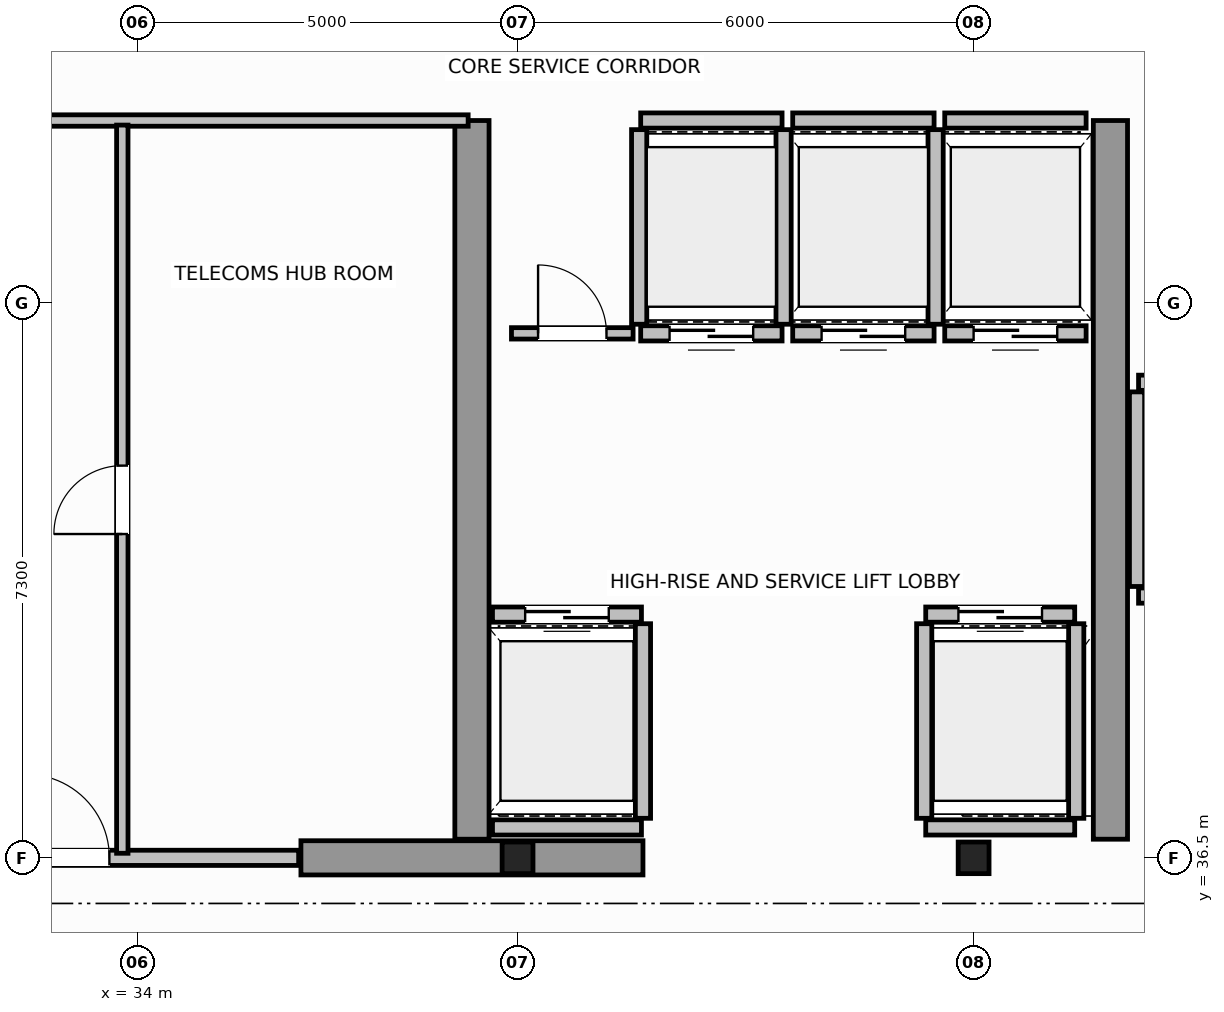
"""IFC4 building model, lengths in metres.
Left out: names, types, materials, properties, quantities, classifications, styles, units other than length and angle.
Written with IfcOpenShell. Run it as: python <this file> out.ifc"""

import sys

from ifc_helpers import new_model, si_unit, direction, frame, frame_2d, origin, origin_2d, place, context, subcontext, project, spatial, rectangle, i_section, extrude, source, transform, mapped, element, fill, save


model = new_model("IFC4")
c1 = context("Model", 3, precision=1e-05, world=origin(), true_north=direction((0.0, 1.0)))
c2 = subcontext(c1, "Body", "Model", "MODEL_VIEW")
j1 = project(units=[si_unit("LENGTHUNIT", "METRE"), si_unit("PLANEANGLEUNIT", "RADIAN")], contexts=[c1])
p1 = place(None, origin())
s1 = spatial("IfcSite", under=j1, at=p1, CompositionType="ELEMENT")
p2 = place(p1, origin())
s2 = spatial("IfcBuilding", under=s1, at=p2, CompositionType="ELEMENT")
p3 = place(p2, frame((0.0, 0.0, 299.2)))
s3 = spatial("IfcBuildingStorey", under=s2, at=p3, CompositionType="ELEMENT", Elevation=299.2)
m1 = source(origin(), c2, "Body", "SweptSolid", [
    extrude(i_section(OverallWidth=0.406, OverallDepth=0.416, WebThickness=0.03, FlangeThickness=0.042, FilletRadius=0.015, at=origin_2d()), origin(), (0.0, 0.0, 1.0), 4.6),
])
for number, where, z_axis, x_axis in (
    (1, (39.0, 36.5, 0.0), (0.0, 0.0, 1.0), (1.0, 0.0, 0.0)),
    (2, (45.0, 36.5, 0.0), (0.0, 0.0, 1.0), (1.0, 0.0, 0.0)),
):
    element("IfcColumn", number, at=place(p3, frame(where, z_axis=z_axis, x_axis=x_axis)), inside=s3, PredefinedType="COLUMN", context=c2, shape_type="MappedRepresentation", body=[
        mapped(m1, transform((0.0, 0.0, 0.0), scale=1.0)),
    ])
p4 = place(p3, frame((36.15, 36.5, 0.0), z_axis=(0.0, 0.0, 1.0), x_axis=(1.0, 0.0, 0.0)))
e3 = element("IfcWall", 3, at=p4, inside=s3, PredefinedType="SHEAR", context=c2, shape_type="SweptSolid", body=[
    extrude(rectangle(XDim=4.5, YDim=0.45, at=frame_2d((2.25, 0.0))), origin(), (0.0, 0.0, 1.0), 4.6),
])
for number, where, z_axis, x_axis in (
    (4, (38.4, 36.745, 0.0), (0.0, 0.0, 1.0), (0.0, 1.0, 0.0)),
    (5, (46.8, 36.745, 0.0), (0.0, 0.0, 1.0), (0.0, 1.0, 0.0)),
):
    element("IfcWall", number, at=place(p3, frame(where, z_axis=z_axis, x_axis=x_axis)), inside=s3, PredefinedType="SHEAR", context=c2, shape_type="SweptSolid", body=[
        extrude(rectangle(XDim=9.455, YDim=0.45, at=frame_2d((4.728, 0.0))), origin(), (0.0, 0.0, 1.0), 4.6),
    ])
p5 = place(p3, frame((38.67, 39.7, 0.0), z_axis=(0.0, 0.0, 1.0), x_axis=(1.0, 0.0, 0.0)))
e6 = element("IfcWall", 6, at=p5, inside=s3, PredefinedType="SOLIDWALL", context=c2, shape_type="SweptSolid", body=[
    extrude(rectangle(XDim=1.96, YDim=0.2, at=frame_2d((0.98, 0.0))), origin(), (0.0, 0.0, 1.0), 4.3),
])
p6 = place(p5, frame((0.43, 0.0, 0.0)))
e7 = element("IfcOpeningElement", 7, at=p6, cuts=e6, PredefinedType="OPENING", context=c2, shape_type="SweptSolid", body=[
    extrude(rectangle(XDim=1.1, YDim=2.15, at=frame_2d((0.55, 1.075))), frame((0.0, 0.11, 0.0), z_axis=(0.0, -1.0, 0.0), x_axis=(1.0, 0.0, 0.0)), (0.0, 0.0, 1.0), 0.22),
])
p7 = place(p3, frame((38.67, 36.9, 0.0), z_axis=(0.0, 0.0, 1.0), x_axis=(1.0, 0.0, 0.0)))
e8 = element("IfcWall", 8, at=p7, inside=s3, PredefinedType="SOLIDWALL", context=c2, shape_type="SweptSolid", body=[
    extrude(rectangle(XDim=1.96, YDim=0.2, at=frame_2d((0.98, 0.0))), origin(), (0.0, 0.0, 1.0), 3.09),
])
p8 = place(p3, frame((40.65, 37.02, 0.0), z_axis=(0.0, 0.0, 1.0), x_axis=(0.0, 1.0, 0.0)))
e9 = element("IfcWall", 9, at=p8, inside=s3, PredefinedType="SOLIDWALL", context=c2, shape_type="SweptSolid", body=[
    extrude(rectangle(XDim=2.56, YDim=0.2, at=frame_2d((1.28, 0.0))), origin(), (0.0, 0.0, 1.0), 4.3),
])
p9 = place(p3, frame((44.37, 39.7, 0.0), z_axis=(0.0, 0.0, 1.0), x_axis=(1.0, 0.0, 0.0)))
e10 = element("IfcWall", 10, at=p9, inside=s3, PredefinedType="SOLIDWALL", context=c2, shape_type="SweptSolid", body=[
    extrude(rectangle(XDim=1.96, YDim=0.2, at=frame_2d((0.98, 0.0))), origin(), (0.0, 0.0, 1.0), 4.3),
])
p10 = place(p9, frame((0.43, 0.0, 0.0)))
e11 = element("IfcOpeningElement", 11, at=p10, cuts=e10, PredefinedType="OPENING", context=c2, shape_type="SweptSolid", body=[
    extrude(rectangle(XDim=1.1, YDim=2.15, at=frame_2d((0.55, 1.075))), frame((0.0, 0.11, 0.0), z_axis=(0.0, -1.0, 0.0), x_axis=(1.0, 0.0, 0.0)), (0.0, 0.0, 1.0), 0.22),
])
p11 = place(p3, frame((44.37, 36.9, 0.0), z_axis=(0.0, 0.0, 1.0), x_axis=(1.0, 0.0, 0.0)))
e12 = element("IfcWall", 12, at=p11, inside=s3, PredefinedType="SOLIDWALL", context=c2, shape_type="SweptSolid", body=[
    extrude(rectangle(XDim=1.96, YDim=0.2, at=frame_2d((0.98, 0.0))), origin(), (0.0, 0.0, 1.0), 3.09),
])
for number, where, z_axis, x_axis in (
    (13, (44.35, 37.02, 0.0), (0.0, 0.0, 1.0), (0.0, 1.0, 0.0)),
    (14, (46.35, 37.02, 0.0), (0.0, 0.0, 1.0), (0.0, 1.0, 0.0)),
):
    element("IfcWall", number, at=place(p3, frame(where, z_axis=z_axis, x_axis=x_axis)), inside=s3, PredefinedType="SOLIDWALL", context=c2, shape_type="SweptSolid", body=[
        extrude(rectangle(XDim=2.56, YDim=0.2, at=frame_2d((1.28, 0.0))), origin(), (0.0, 0.0, 1.0), 4.3),
    ])
p12 = place(p3, frame((40.62, 43.4, 0.0), z_axis=(0.0, 0.0, 1.0), x_axis=(1.0, 0.0, 0.0)))
e15 = element("IfcWall", 15, at=p12, inside=s3, PredefinedType="SOLIDWALL", context=c2, shape_type="SweptSolid", body=[
    extrude(rectangle(XDim=1.86, YDim=0.2, at=frame_2d((0.93, 0.0))), origin(), (0.0, 0.0, 1.0), 4.3),
])
p13 = place(p12, frame((0.38, 0.0, 0.0)))
e16 = element("IfcOpeningElement", 16, at=p13, cuts=e15, PredefinedType="OPENING", context=c2, shape_type="SweptSolid", body=[
    extrude(rectangle(XDim=1.1, YDim=2.15, at=frame_2d((0.55, 1.075))), frame((0.0, 0.11, 0.0), z_axis=(0.0, -1.0, 0.0), x_axis=(1.0, 0.0, 0.0)), (0.0, 0.0, 1.0), 0.22),
])
p14 = place(p3, frame((40.62, 46.2, 0.0), z_axis=(0.0, 0.0, 1.0), x_axis=(1.0, 0.0, 0.0)))
e17 = element("IfcWall", 17, at=p14, inside=s3, PredefinedType="SOLIDWALL", context=c2, shape_type="SweptSolid", body=[
    extrude(rectangle(XDim=1.86, YDim=0.2, at=frame_2d((0.93, 0.0))), origin(), (0.0, 0.0, 1.0), 4.3),
])
for number, where, z_axis, x_axis in (
    (18, (40.6, 43.52, 0.0), (0.0, 0.0, 1.0), (0.0, 1.0, 0.0)),
    (19, (42.5, 43.52, 0.0), (0.0, 0.0, 1.0), (0.0, 1.0, 0.0)),
):
    element("IfcWall", number, at=place(p3, frame(where, z_axis=z_axis, x_axis=x_axis)), inside=s3, PredefinedType="SOLIDWALL", context=c2, shape_type="SweptSolid", body=[
        extrude(rectangle(XDim=2.56, YDim=0.2, at=frame_2d((1.28, 0.0))), origin(), (0.0, 0.0, 1.0), 4.3),
    ])
p15 = place(p3, frame((42.62, 43.4, 0.0), z_axis=(0.0, 0.0, 1.0), x_axis=(1.0, 0.0, 0.0)))
e20 = element("IfcWall", 20, at=p15, inside=s3, PredefinedType="SOLIDWALL", context=c2, shape_type="SweptSolid", body=[
    extrude(rectangle(XDim=1.86, YDim=0.2, at=frame_2d((0.93, 0.0))), origin(), (0.0, 0.0, 1.0), 4.3),
])
p16 = place(p15, frame((0.38, 0.0, 0.0)))
e21 = element("IfcOpeningElement", 21, at=p16, cuts=e20, PredefinedType="OPENING", context=c2, shape_type="SweptSolid", body=[
    extrude(rectangle(XDim=1.1, YDim=2.15, at=frame_2d((0.55, 1.075))), frame((0.0, 0.11, 0.0), z_axis=(0.0, -1.0, 0.0), x_axis=(1.0, 0.0, 0.0)), (0.0, 0.0, 1.0), 0.22),
])
p17 = place(p3, frame((42.62, 46.2, 0.0), z_axis=(0.0, 0.0, 1.0), x_axis=(1.0, 0.0, 0.0)))
e22 = element("IfcWall", 22, at=p17, inside=s3, PredefinedType="SOLIDWALL", context=c2, shape_type="SweptSolid", body=[
    extrude(rectangle(XDim=1.86, YDim=0.2, at=frame_2d((0.93, 0.0))), origin(), (0.0, 0.0, 1.0), 4.3),
])
p18 = place(p3, frame((44.5, 43.52, 0.0), z_axis=(0.0, 0.0, 1.0), x_axis=(0.0, 1.0, 0.0)))
e23 = element("IfcWall", 23, at=p18, inside=s3, PredefinedType="SOLIDWALL", context=c2, shape_type="SweptSolid", body=[
    extrude(rectangle(XDim=2.56, YDim=0.2, at=frame_2d((1.28, 0.0))), origin(), (0.0, 0.0, 1.0), 3.09),
])
p19 = place(p3, frame((44.62, 43.4, 0.0), z_axis=(0.0, 0.0, 1.0), x_axis=(1.0, 0.0, 0.0)))
e24 = element("IfcWall", 24, at=p19, inside=s3, PredefinedType="SOLIDWALL", context=c2, shape_type="SweptSolid", body=[
    extrude(rectangle(XDim=1.86, YDim=0.2, at=frame_2d((0.93, 0.0))), origin(), (0.0, 0.0, 1.0), 4.3),
])
p20 = place(p19, frame((0.38, 0.0, 0.0)))
e25 = element("IfcOpeningElement", 25, at=p20, cuts=e24, PredefinedType="OPENING", context=c2, shape_type="SweptSolid", body=[
    extrude(rectangle(XDim=1.1, YDim=2.15, at=frame_2d((0.55, 1.075))), frame((0.0, 0.11, 0.0), z_axis=(0.0, -1.0, 0.0), x_axis=(1.0, 0.0, 0.0)), (0.0, 0.0, 1.0), 0.22),
])
p21 = place(p3, frame((44.62, 46.2, 0.0), z_axis=(0.0, 0.0, 1.0), x_axis=(1.0, 0.0, 0.0)))
e26 = element("IfcWall", 26, at=p21, inside=s3, PredefinedType="SOLIDWALL", context=c2, shape_type="SweptSolid", body=[
    extrude(rectangle(XDim=1.86, YDim=0.2, at=frame_2d((0.93, 0.0))), origin(), (0.0, 0.0, 1.0), 4.3),
])
p22 = place(p3, frame((47.17, 39.95, 0.0), z_axis=(0.0, 0.0, 1.0), x_axis=(1.0, 0.0, 0.0)))
e27 = element("IfcWall", 27, at=p22, inside=s3, PredefinedType="SOLIDWALL", context=c2, shape_type="SweptSolid", body=[
    extrude(rectangle(XDim=2.16, YDim=0.2, at=frame_2d((1.08, 0.0))), origin(), (0.0, 0.0, 1.0), 4.3),
])
p23 = place(p22, frame((0.53, 0.0, 0.0)))
e28 = element("IfcOpeningElement", 28, at=p23, cuts=e27, PredefinedType="OPENING", context=c2, shape_type="SweptSolid", body=[
    extrude(rectangle(XDim=1.1, YDim=2.15, at=frame_2d((0.55, 1.075))), frame((0.0, 0.11, 0.0), z_axis=(0.0, -1.0, 0.0), x_axis=(1.0, 0.0, 0.0)), (0.0, 0.0, 1.0), 0.22),
])
p24 = place(p3, frame((47.17, 42.75, 0.0), z_axis=(0.0, 0.0, 1.0), x_axis=(1.0, 0.0, 0.0)))
e29 = element("IfcWall", 29, at=p24, inside=s3, PredefinedType="SOLIDWALL", context=c2, shape_type="SweptSolid", body=[
    extrude(rectangle(XDim=2.16, YDim=0.2, at=frame_2d((1.08, 0.0))), origin(), (0.0, 0.0, 1.0), 4.3),
])
p25 = place(p3, frame((47.15, 40.07, 0.0), z_axis=(0.0, 0.0, 1.0), x_axis=(0.0, 1.0, 0.0)))
e30 = element("IfcWall", 30, at=p25, inside=s3, PredefinedType="SOLIDWALL", context=c2, shape_type="SweptSolid", body=[
    extrude(rectangle(XDim=2.56, YDim=0.2, at=frame_2d((1.28, 0.0))), origin(), (0.0, 0.0, 1.0), 4.3),
])
p26 = place(p3, frame((32.08, 36.5, 0.0), z_axis=(0.0, 0.0, 1.0), x_axis=(1.0, 0.0, 0.0)))
e31 = element("IfcWall", 31, at=p26, inside=s3, PredefinedType="SOLIDWALL", context=c2, shape_type="SweptSolid", body=[
    extrude(rectangle(XDim=4.04, YDim=0.2, at=frame_2d((2.02, 0.0))), origin(), (0.0, 0.0, 1.0), 3.09),
])
p27 = place(p26, frame((0.45, 0.0, 0.0)))
e32 = element("IfcOpeningElement", 32, at=p27, cuts=e31, PredefinedType="OPENING", context=c2, shape_type="SweptSolid", body=[
    extrude(rectangle(XDim=1.1, YDim=2.15, at=frame_2d((0.55, 1.075))), frame((0.0, 0.11, 0.0), z_axis=(0.0, -1.0, 0.0), x_axis=(1.0, 0.0, 0.0)), (0.0, 0.0, 1.0), 0.22),
])
p28 = place(p3, frame((29.85, 46.2, 0.0), z_axis=(0.0, 0.0, 1.0), x_axis=(1.0, 0.0, 0.0)))
e33 = element("IfcWall", 33, at=p28, inside=s3, PredefinedType="PARTITIONING", context=c2, shape_type="SweptSolid", body=[
    extrude(rectangle(XDim=8.5, YDim=0.15, at=frame_2d((4.25, 0.0))), origin(), (0.0, 0.0, 1.0), 4.3),
])
p29 = place(p3, frame((33.8, 36.56, 0.0), z_axis=(0.0, 0.0, 1.0), x_axis=(0.0, 1.0, 0.0)))
e34 = element("IfcWall", 34, at=p29, inside=s3, PredefinedType="PARTITIONING", context=c2, shape_type="SweptSolid", body=[
    extrude(rectangle(XDim=9.58, YDim=0.15, at=frame_2d((4.79, 0.0))), origin(), (0.0, 0.0, 1.0), 4.3),
])
p30 = place(p29, frame((4.2, 0.0, 0.0)))
e35 = element("IfcOpeningElement", 35, at=p30, cuts=e34, PredefinedType="OPENING", context=c2, shape_type="SweptSolid", body=[
    extrude(rectangle(XDim=0.9, YDim=2.1, at=frame_2d((0.45, 1.05))), frame((0.0, 0.085, 0.0), z_axis=(0.0, -1.0, 0.0), x_axis=(1.0, 0.0, 0.0)), (0.0, 0.0, 1.0), 0.17),
])
p31 = place(p3, frame((38.92, 43.4, 0.0), z_axis=(0.0, 0.0, 1.0), x_axis=(1.0, 0.0, 0.0)))
e36 = element("IfcWall", 36, at=p31, inside=s3, PredefinedType="PARTITIONING", context=c2, shape_type="SweptSolid", body=[
    extrude(rectangle(XDim=1.6, YDim=0.15, at=frame_2d((0.8, 0.0))), origin(), (0.0, 0.0, 1.0), 4.3),
])
p32 = place(p31, frame((0.35, 0.0, 0.0)))
e37 = element("IfcOpeningElement", 37, at=p32, cuts=e36, PredefinedType="OPENING", context=c2, shape_type="SweptSolid", body=[
    extrude(rectangle(XDim=0.9, YDim=2.1, at=frame_2d((0.45, 1.05))), frame((0.0, 0.085, 0.0), z_axis=(0.0, -1.0, 0.0), x_axis=(1.0, 0.0, 0.0)), (0.0, 0.0, 1.0), 0.17),
])
m2 = source(origin(), c2, "Body", "SweptSolid", [
    extrude(rectangle(XDim=1.1, YDim=2.15, at=frame_2d((0.55, 1.075))), frame((0.0, 0.025, 0.0), z_axis=(0.0, -1.0, 0.0), x_axis=(1.0, 0.0, 0.0)), (0.0, 0.0, 1.0), 0.05),
])
p33 = place(p6, origin())
e38 = element("IfcDoor", 38, at=p33, inside=s3, OperationType="DOUBLE_DOOR_SLIDING", PredefinedType="DOOR", context=c2, shape_type="MappedRepresentation", body=[
    mapped(m2, transform((0.0, 0.0, 0.0), scale=1.0)),
])
fill(e7, e38)
p34 = place(p10, origin())
e39 = element("IfcDoor", 39, at=p34, inside=s3, OperationType="DOUBLE_DOOR_SLIDING", PredefinedType="DOOR", context=c2, shape_type="MappedRepresentation", body=[
    mapped(m2, transform((0.0, 0.0, 0.0), scale=1.0)),
])
fill(e11, e39)
p35 = place(p13, origin())
e40 = element("IfcDoor", 40, at=p35, inside=s3, OperationType="DOUBLE_DOOR_SLIDING", PredefinedType="DOOR", context=c2, shape_type="MappedRepresentation", body=[
    mapped(m2, transform((0.0, 0.0, 0.0), scale=1.0)),
])
fill(e16, e40)
p36 = place(p16, origin())
e41 = element("IfcDoor", 41, at=p36, inside=s3, OperationType="DOUBLE_DOOR_SLIDING", PredefinedType="DOOR", context=c2, shape_type="MappedRepresentation", body=[
    mapped(m2, transform((0.0, 0.0, 0.0), scale=1.0)),
])
fill(e21, e41)
p37 = place(p20, origin())
e42 = element("IfcDoor", 42, at=p37, inside=s3, OperationType="DOUBLE_DOOR_SLIDING", PredefinedType="DOOR", context=c2, shape_type="MappedRepresentation", body=[
    mapped(m2, transform((0.0, 0.0, 0.0), scale=1.0)),
])
fill(e25, e42)
p38 = place(p27, origin())
e43 = element("IfcDoor", 43, at=p38, inside=s3, OperationType="SINGLE_SWING_LEFT", PredefinedType="DOOR", context=c2, shape_type="MappedRepresentation", body=[
    mapped(m2, transform((0.0, 0.0, 0.0), scale=1.0)),
])
fill(e32, e43)
m3 = source(origin(), c2, "Body", "SweptSolid", [
    extrude(rectangle(XDim=0.9, YDim=2.1, at=frame_2d((0.45, 1.05))), frame((0.0, 0.025, 0.0), z_axis=(0.0, -1.0, 0.0), x_axis=(1.0, 0.0, 0.0)), (0.0, 0.0, 1.0), 0.05),
])
p39 = place(p30, origin())
e44 = element("IfcDoor", 44, at=p39, inside=s3, OperationType="SINGLE_SWING_RIGHT", PredefinedType="DOOR", context=c2, shape_type="MappedRepresentation", body=[
    mapped(m3, transform((0.0, 0.0, 0.0), scale=1.0)),
])
fill(e35, e44)
p40 = place(p32, origin())
e45 = element("IfcDoor", 45, at=p40, inside=s3, OperationType="SINGLE_SWING_LEFT", PredefinedType="DOOR", context=c2, shape_type="MappedRepresentation", body=[
    mapped(m3, transform((0.0, 0.0, 0.0), scale=1.0)),
])
fill(e37, e45)
save(model, sys.argv[1])
